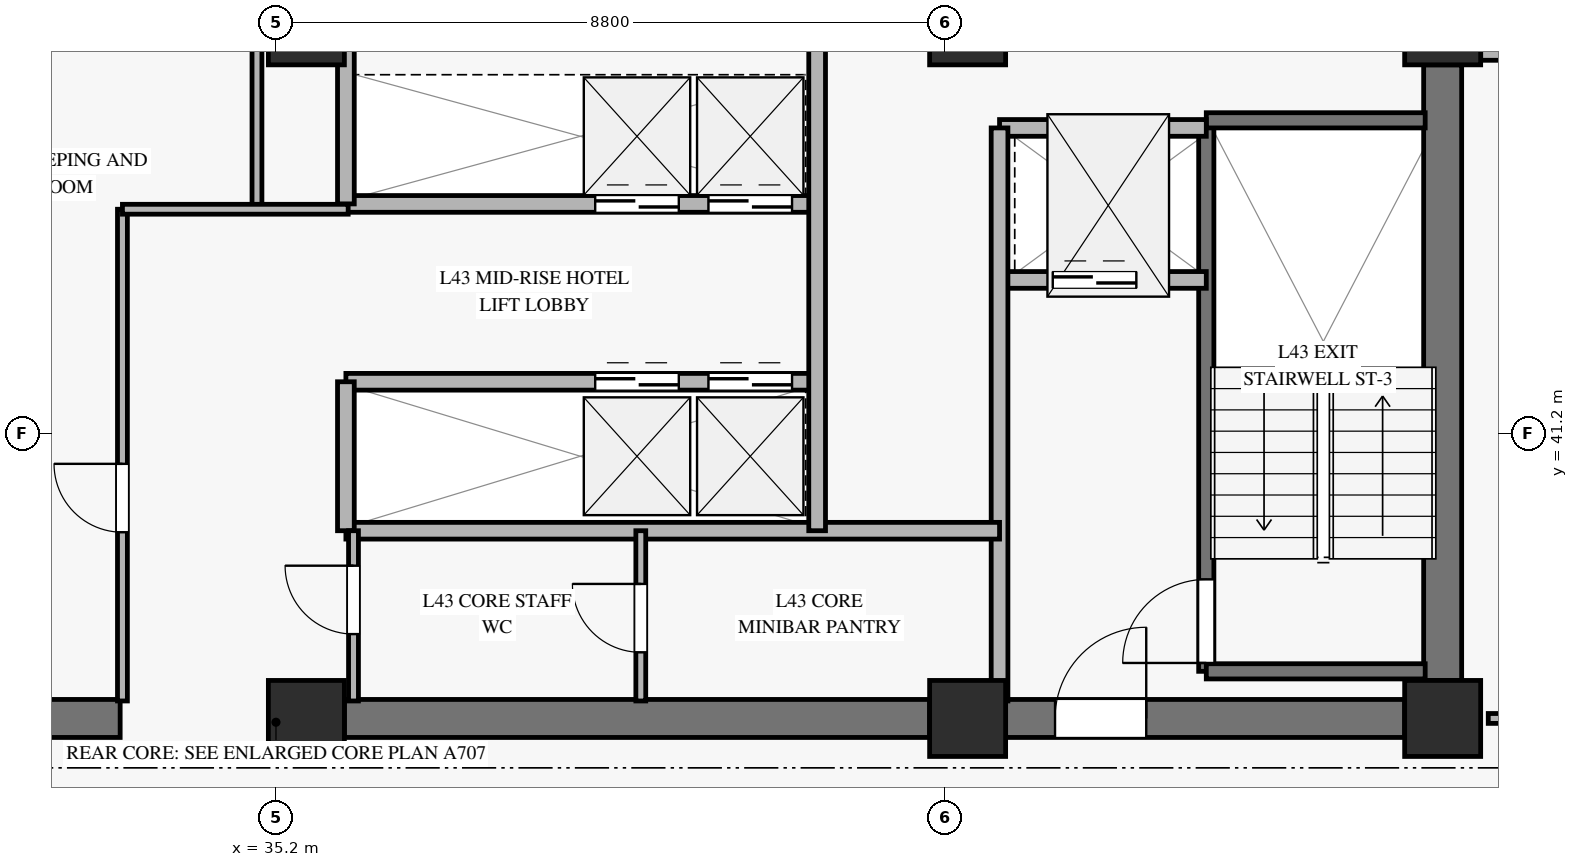
"""IFC4 building model, lengths in metres.
Left out: names, types, materials, properties, quantities, classifications, styles, units other than length and angle.
Written with IfcOpenShell. Run it as: python <this file> out.ifc"""

import sys

from ifc_helpers import new_model, si_unit, direction, frame, frame_2d, origin, origin_2d, place, context, subcontext, project, spatial, rectangle, extrude, source, transform, mapped, element, fill, save


model = new_model("IFC4")
c1 = context("Model", 3, precision=1e-05, world=origin(), true_north=direction((0.0, 1.0)))
c2 = subcontext(c1, "Body", "Model", "MODEL_VIEW")
j1 = project(units=[si_unit("LENGTHUNIT", "METRE"), si_unit("PLANEANGLEUNIT", "RADIAN")], contexts=[c1])
p1 = place(None, origin())
s1 = spatial("IfcSite", under=j1, at=p1, CompositionType="ELEMENT")
p2 = place(p1, origin())
s2 = spatial("IfcBuilding", under=s1, at=p2, CompositionType="ELEMENT")
p3 = place(p2, frame((0.0, 0.0, 173.7)))
s3 = spatial("IfcBuildingStorey", under=s2, at=p3, CompositionType="ELEMENT", Elevation=173.7)
m1 = source(origin(), c2, "Body", "SweptSolid", [
    extrude(rectangle(XDim=1.0, YDim=1.0, at=origin_2d()), origin(), (0.0, 0.0, 1.0), 3.27),
])
for number, where, z_axis, x_axis in (
    (1, (35.6, 37.45, 0.0), (0.0, 0.0, 1.0), (1.0, 0.0, 0.0)),
    (2, (35.6, 46.55, 0.0), (0.0, 0.0, 1.0), (1.0, 0.0, 0.0)),
    (3, (44.3, 37.45, 0.0), (0.0, 0.0, 1.0), (1.0, 0.0, 0.0)),
    (4, (44.3, 46.55, 0.0), (0.0, 0.0, 1.0), (1.0, 0.0, 0.0)),
    (5, (50.55, 37.45, 0.0), (0.0, 0.0, 1.0), (1.0, 0.0, 0.0)),
    (6, (50.55, 46.55, 0.0), (0.0, 0.0, 1.0), (1.0, 0.0, 0.0)),
):
    element("IfcColumn", number, at=place(p3, frame(where, z_axis=z_axis, x_axis=x_axis)), inside=s3, PredefinedType="PILASTER", context=c2, shape_type="MappedRepresentation", body=[
        mapped(m1, transform((0.0, 0.0, 0.0), x_axis=(1.0, 0.0, 0.0), y_axis=(0.0, 1.0, 0.0), z_axis=(0.0, 0.0, 1.0), scale=1.0)),
    ])
p4 = place(p3, frame((31.3, 37.45, 0.0), z_axis=(0.0, 0.0, 1.0), x_axis=(1.0, 0.0, 0.0)))
e7 = element("IfcWall", 7, at=p4, inside=s3, PredefinedType="SHEAR", context=c2, shape_type="SweptSolid", body=[
    extrude(rectangle(XDim=1.85, YDim=0.5, at=frame_2d((0.925, 0.0))), origin(), (0.0, 0.0, 1.0), 3.27),
])
p5 = place(p3, frame((36.1, 37.45, 0.0), z_axis=(0.0, 0.0, 1.0), x_axis=(1.0, 0.0, 0.0)))
e8 = element("IfcWall", 8, at=p5, inside=s3, PredefinedType="SHEAR", context=c2, shape_type="SweptSolid", body=[
    extrude(rectangle(XDim=7.7, YDim=0.5, at=frame_2d((3.85, 0.0))), origin(), (0.0, 0.0, 1.0), 3.27),
])
p6 = place(p3, frame((44.8, 37.45, 0.0), z_axis=(0.0, 0.0, 1.0), x_axis=(1.0, 0.0, 0.0)))
e9 = element("IfcWall", 9, at=p6, inside=s3, PredefinedType="SHEAR", context=c2, shape_type="SweptSolid", body=[
    extrude(rectangle(XDim=5.25, YDim=0.5, at=frame_2d((2.625, 0.0))), origin(), (0.0, 0.0, 1.0), 3.27),
])
p7 = place(p6, frame((0.65, 0.0, 0.0)))
e10 = element("IfcOpeningElement", 10, at=p7, cuts=e9, PredefinedType="OPENING", context=c2, shape_type="SweptSolid", body=[
    extrude(rectangle(XDim=1.2, YDim=2.15, at=frame_2d((0.6, 1.075))), frame((0.0, 0.26, 0.0), z_axis=(0.0, -1.0, 0.0), x_axis=(1.0, 0.0, 0.0)), (0.0, 0.0, 1.0), 0.52),
])
p8 = place(p3, frame((50.55, 37.95, 0.0), z_axis=(0.0, 0.0, 1.0), x_axis=(0.0, 1.0, 0.0)))
e11 = element("IfcWall", 11, at=p8, inside=s3, PredefinedType="SHEAR", context=c2, shape_type="SweptSolid", body=[
    extrude(rectangle(XDim=8.1, YDim=0.5, at=frame_2d((4.05, 0.0))), origin(), (0.0, 0.0, 1.0), 3.27),
])
p9 = place(p3, frame((51.05, 46.25, 0.0), z_axis=(0.0, 0.0, 1.0), x_axis=(1.0, 0.0, 0.0)))
e12 = element("IfcWall", 12, at=p9, inside=s3, PredefinedType="SOLIDWALL", context=c2, shape_type="SweptSolid", body=[
    extrude(rectangle(XDim=10.194, YDim=0.28, at=frame_2d((5.097, 0.0))), origin(), (0.0, 0.0, 1.0), 2.75),
])
p10 = place(p9, frame((4.297, 0.0, 0.45)))
e13 = element("IfcOpeningElement", 13, at=p10, cuts=e12, PredefinedType="OPENING", context=c2, shape_type="SweptSolid", body=[
    extrude(rectangle(XDim=1.6, YDim=2.0, at=frame_2d((0.8, 1.0))), frame((0.0, 0.15, 0.0), z_axis=(0.0, -1.0, 0.0), x_axis=(1.0, 0.0, 0.0)), (0.0, 0.0, 1.0), 0.3),
])
p11 = place(p3, frame((47.44, 38.07, 0.0), z_axis=(0.0, 0.0, 1.0), x_axis=(0.0, 1.0, 0.0)))
e14 = element("IfcWall", 14, at=p11, inside=s3, PredefinedType="SOLIDWALL", context=c2, shape_type="SweptSolid", body=[
    extrude(rectangle(XDim=7.25, YDim=0.2, at=frame_2d((3.625, 0.0))), origin(), (0.0, 0.0, 1.0), 3.5),
])
p12 = place(p11, frame((0.11, 0.0, 0.0)))
e15 = element("IfcOpeningElement", 15, at=p12, cuts=e14, PredefinedType="OPENING", context=c2, shape_type="SweptSolid", body=[
    extrude(rectangle(XDim=1.1, YDim=2.15, at=frame_2d((0.55, 1.075))), frame((0.0, 0.11, 0.0), z_axis=(0.0, -1.0, 0.0), x_axis=(1.0, 0.0, 0.0)), (0.0, 0.0, 1.0), 0.22),
])
for number, where, z_axis, x_axis in (
    (16, (47.44, 45.32, 0.0), (0.0, 0.0, 1.0), (1.0, 0.0, 0.0)),
    (17, (47.44, 38.07, 0.0), (0.0, 0.0, 1.0), (1.0, 0.0, 0.0)),
):
    element("IfcWall", number, at=place(p3, frame(where, z_axis=z_axis, x_axis=x_axis)), inside=s3, PredefinedType="SOLIDWALL", context=c2, shape_type="SweptSolid", body=[
        extrude(rectangle(XDim=2.88, YDim=0.2, at=frame_2d((1.44, 0.0))), origin(), (0.0, 0.0, 1.0), 3.5),
    ])
p13 = place(p3, frame((44.72, 43.22, 0.0), z_axis=(0.0, 0.0, 1.0), x_axis=(1.0, 0.0, 0.0)))
e18 = element("IfcWall", 18, at=p13, inside=s3, PredefinedType="SOLIDWALL", context=c2, shape_type="SweptSolid", body=[
    extrude(rectangle(XDim=2.72, YDim=0.22, at=frame_2d((1.36, 0.0))), origin(), (0.0, 0.0, 1.0), 3.27),
])
p14 = place(p13, frame((0.7, 0.0, 0.0)))
e19 = element("IfcOpeningElement", 19, at=p14, cuts=e18, PredefinedType="OPENING", context=c2, shape_type="SweptSolid", body=[
    extrude(rectangle(XDim=1.1, YDim=2.2, at=frame_2d((0.55, 1.1))), frame((0.0, 0.12, 0.0), z_axis=(0.0, -1.0, 0.0), x_axis=(1.0, 0.0, 0.0)), (0.0, 0.0, 1.0), 0.24),
])
p15 = place(p3, frame((44.72, 45.22, 0.0), z_axis=(0.0, 0.0, 1.0), x_axis=(1.0, 0.0, 0.0)))
e20 = element("IfcWall", 20, at=p15, inside=s3, PredefinedType="SOLIDWALL", context=c2, shape_type="SweptSolid", body=[
    extrude(rectangle(XDim=2.72, YDim=0.22, at=frame_2d((1.36, 0.0))), origin(), (0.0, 0.0, 1.0), 3.27),
])
p16 = place(p3, frame((44.72, 37.68, 0.0), z_axis=(0.0, 0.0, 1.0), x_axis=(0.0, 1.0, 0.0)))
e21 = element("IfcWall", 21, at=p16, inside=s3, PredefinedType="SOLIDWALL", context=c2, shape_type="SweptSolid", body=[
    extrude(rectangle(XDim=7.54, YDim=0.22, at=frame_2d((3.77, 0.0))), origin(), (0.0, 0.0, 1.0), 3.27),
])
p17 = place(p3, frame((36.12, 44.22, 0.0), z_axis=(0.0, 0.0, 1.0), x_axis=(1.0, 0.0, 0.0)))
e22 = element("IfcWall", 22, at=p17, inside=s3, PredefinedType="SOLIDWALL", context=c2, shape_type="SweptSolid", body=[
    extrude(rectangle(XDim=6.2, YDim=0.22, at=frame_2d((3.1, 0.0))), origin(), (0.0, 0.0, 1.0), 3.27),
])
p18 = place(p17, frame((3.28, 0.0, 0.0)))
e23 = element("IfcOpeningElement", 23, at=p18, cuts=e22, PredefinedType="OPENING", context=c2, shape_type="SweptSolid", body=[
    extrude(rectangle(XDim=1.1, YDim=2.2, at=frame_2d((0.55, 1.1))), frame((0.0, 0.12, 0.0), z_axis=(0.0, -1.0, 0.0), x_axis=(1.0, 0.0, 0.0)), (0.0, 0.0, 1.0), 0.24),
])
p19 = place(p17, frame((4.77, 0.0, 0.0)))
e24 = element("IfcOpeningElement", 24, at=p19, cuts=e22, PredefinedType="OPENING", context=c2, shape_type="SweptSolid", body=[
    extrude(rectangle(XDim=1.1, YDim=2.2, at=frame_2d((0.55, 1.1))), frame((0.0, 0.12, 0.0), z_axis=(0.0, -1.0, 0.0), x_axis=(1.0, 0.0, 0.0)), (0.0, 0.0, 1.0), 0.24),
])
p20 = place(p3, frame((36.12, 41.88, 0.0), z_axis=(0.0, 0.0, 1.0), x_axis=(1.0, 0.0, 0.0)))
e25 = element("IfcWall", 25, at=p20, inside=s3, PredefinedType="SOLIDWALL", context=c2, shape_type="SweptSolid", body=[
    extrude(rectangle(XDim=6.2, YDim=0.22, at=frame_2d((3.1, 0.0))), origin(), (0.0, 0.0, 1.0), 3.27),
])
p21 = place(p20, frame((3.28, 0.0, 0.0)))
e26 = element("IfcOpeningElement", 26, at=p21, cuts=e25, PredefinedType="OPENING", context=c2, shape_type="SweptSolid", body=[
    extrude(rectangle(XDim=1.1, YDim=2.2, at=frame_2d((0.55, 1.1))), frame((0.0, 0.12, 0.0), z_axis=(0.0, -1.0, 0.0), x_axis=(1.0, 0.0, 0.0)), (0.0, 0.0, 1.0), 0.24),
])
p22 = place(p20, frame((4.77, 0.0, 0.0)))
e27 = element("IfcOpeningElement", 27, at=p22, cuts=e25, PredefinedType="OPENING", context=c2, shape_type="SweptSolid", body=[
    extrude(rectangle(XDim=1.1, YDim=2.2, at=frame_2d((0.55, 1.1))), frame((0.0, 0.12, 0.0), z_axis=(0.0, -1.0, 0.0), x_axis=(1.0, 0.0, 0.0)), (0.0, 0.0, 1.0), 0.24),
])
p23 = place(p3, frame((36.12, 39.92, 0.0), z_axis=(0.0, 0.0, 1.0), x_axis=(1.0, 0.0, 0.0)))
e28 = element("IfcWall", 28, at=p23, inside=s3, PredefinedType="SOLIDWALL", context=c2, shape_type="SweptSolid", body=[
    extrude(rectangle(XDim=8.6, YDim=0.22, at=frame_2d((4.3, 0.0))), origin(), (0.0, 0.0, 1.0), 2.555),
])
p24 = place(p3, frame((42.32, 39.92, 0.0), z_axis=(0.0, 0.0, 1.0), x_axis=(0.0, 1.0, 0.0)))
e29 = element("IfcWall", 29, at=p24, inside=s3, PredefinedType="SOLIDWALL", context=c2, shape_type="SweptSolid", body=[
    extrude(rectangle(XDim=6.4, YDim=0.22, at=frame_2d((3.2, 0.0))), origin(), (0.0, 0.0, 1.0), 3.27),
])
p25 = place(p3, frame((36.12, 39.92, 0.0), z_axis=(0.0, 0.0, 1.0), x_axis=(0.0, 1.0, 0.0)))
e30 = element("IfcWall", 30, at=p25, inside=s3, PredefinedType="SOLIDWALL", context=c2, shape_type="SweptSolid", body=[
    extrude(rectangle(XDim=1.96, YDim=0.22, at=frame_2d((0.98, 0.0))), origin(), (0.0, 0.0, 1.0), 3.27),
])
p26 = place(p3, frame((36.12, 44.22, 0.0), z_axis=(0.0, 0.0, 1.0), x_axis=(0.0, 1.0, 0.0)))
e31 = element("IfcWall", 31, at=p26, inside=s3, PredefinedType="SOLIDWALL", context=c2, shape_type="SweptSolid", body=[
    extrude(rectangle(XDim=2.1, YDim=0.22, at=frame_2d((1.05, 0.0))), origin(), (0.0, 0.0, 1.0), 3.27),
])
p27 = place(p3, frame((33.18, 37.68, 0.0), z_axis=(0.0, 0.0, 1.0), x_axis=(0.0, 1.0, 0.0)))
e32 = element("IfcWall", 32, at=p27, inside=s3, PredefinedType="PARTITIONING", context=c2, shape_type="SweptSolid", body=[
    extrude(rectangle(XDim=6.47, YDim=0.13, at=frame_2d((3.235, 0.0))), origin(), (0.0, 0.0, 1.0), 2.355),
])
p28 = place(p27, frame((2.22, 0.0, 0.0)))
e33 = element("IfcOpeningElement", 33, at=p28, cuts=e32, PredefinedType="OPENING", context=c2, shape_type="SweptSolid", body=[
    extrude(rectangle(XDim=0.9, YDim=2.1, at=frame_2d((0.45, 1.05))), frame((0.0, 0.075, 0.0), z_axis=(0.0, -1.0, 0.0), x_axis=(1.0, 0.0, 0.0)), (0.0, 0.0, 1.0), 0.15),
])
p29 = place(p3, frame((34.95, 44.15, 0.0), z_axis=(0.0, 0.0, 1.0), x_axis=(0.0, 1.0, 0.0)))
e34 = element("IfcWall", 34, at=p29, inside=s3, PredefinedType="PARTITIONING", context=c2, shape_type="SweptSolid", body=[
    extrude(rectangle(XDim=2.17, YDim=0.13, at=frame_2d((1.085, 0.0))), origin(), (0.0, 0.0, 1.0), 3.27),
])
p30 = place(p3, frame((33.18, 44.15, 0.0), z_axis=(0.0, 0.0, 1.0), x_axis=(1.0, 0.0, 0.0)))
e35 = element("IfcWall", 35, at=p30, inside=s3, PredefinedType="PARTITIONING", context=c2, shape_type="SweptSolid", body=[
    extrude(rectangle(XDim=2.97, YDim=0.13, at=frame_2d((1.485, 0.0))), origin(), (0.0, 0.0, 1.0), 2.555),
])
p31 = place(p3, frame((36.22, 37.68, 0.0), z_axis=(0.0, 0.0, 1.0), x_axis=(0.0, 1.0, 0.0)))
e36 = element("IfcWall", 36, at=p31, inside=s3, PredefinedType="PARTITIONING", context=c2, shape_type="SweptSolid", body=[
    extrude(rectangle(XDim=2.24, YDim=0.13, at=frame_2d((1.12, 0.0))), origin(), (0.0, 0.0, 1.0), 3.27),
])
p32 = place(p31, frame((0.88, 0.0, 0.0)))
e37 = element("IfcOpeningElement", 37, at=p32, cuts=e36, PredefinedType="OPENING", context=c2, shape_type="SweptSolid", body=[
    extrude(rectangle(XDim=0.9, YDim=2.1, at=frame_2d((0.45, 1.05))), frame((0.0, 0.075, 0.0), z_axis=(0.0, -1.0, 0.0), x_axis=(1.0, 0.0, 0.0)), (0.0, 0.0, 1.0), 0.15),
])
p33 = place(p3, frame((40.0, 37.68, 0.0), z_axis=(0.0, 0.0, 1.0), x_axis=(0.0, 1.0, 0.0)))
e38 = element("IfcWall", 38, at=p33, inside=s3, PredefinedType="PARTITIONING", context=c2, shape_type="SweptSolid", body=[
    extrude(rectangle(XDim=2.24, YDim=0.13, at=frame_2d((1.12, 0.0))), origin(), (0.0, 0.0, 1.0), 3.27),
])
p34 = place(p33, frame((0.64, 0.0, 0.0)))
e39 = element("IfcOpeningElement", 39, at=p34, cuts=e38, PredefinedType="OPENING", context=c2, shape_type="SweptSolid", body=[
    extrude(rectangle(XDim=0.9, YDim=2.1, at=frame_2d((0.45, 1.05))), frame((0.0, 0.075, 0.0), z_axis=(0.0, -1.0, 0.0), x_axis=(1.0, 0.0, 0.0)), (0.0, 0.0, 1.0), 0.15),
])
p35 = place(p3, frame((51.15, 37.45, 0.0), z_axis=(0.0, 0.0, 1.0), x_axis=(1.0, 0.0, 0.0)))
e40 = element("IfcWall", 40, at=p35, inside=s3, PredefinedType="PARTITIONING", context=c2, shape_type="SweptSolid", body=[
    extrude(rectangle(XDim=13.331, YDim=0.13, at=frame_2d((6.666, 0.0))), origin(), (0.0, 0.0, 1.0), 2.755),
])
p36 = place(p35, frame((0.5, 0.0, 0.0)))
e41 = element("IfcOpeningElement", 41, at=p36, cuts=e40, PredefinedType="OPENING", context=c2, shape_type="SweptSolid", body=[
    extrude(rectangle(XDim=0.9, YDim=2.1, at=frame_2d((0.45, 1.05))), frame((0.0, 0.075, 0.0), z_axis=(0.0, -1.0, 0.0), x_axis=(1.0, 0.0, 0.0)), (0.0, 0.0, 1.0), 0.15),
])
p37 = place(p35, frame((9.772, 0.0, 0.0)))
e42 = element("IfcOpeningElement", 42, at=p37, cuts=e40, PredefinedType="OPENING", context=c2, shape_type="SweptSolid", body=[
    extrude(rectangle(XDim=0.95, YDim=2.1, at=frame_2d((0.475, 1.05))), frame((0.0, 0.075, 0.0), z_axis=(0.0, -1.0, 0.0), x_axis=(1.0, 0.0, 0.0)), (0.0, 0.0, 1.0), 0.15),
])
m2 = source(origin(), c2, "Body", "SweptSolid", [
    extrude(rectangle(XDim=1.1, YDim=2.15, at=frame_2d((0.55, 1.075))), frame((0.0, 0.025, 0.0), z_axis=(0.0, -1.0, 0.0), x_axis=(1.0, 0.0, 0.0)), (0.0, 0.0, 1.0), 0.05),
])
p38 = place(p12, origin())
e43 = element("IfcDoor", 43, at=p38, inside=s3, OperationType="SINGLE_SWING_LEFT", PredefinedType="DOOR", context=c2, shape_type="MappedRepresentation", body=[
    mapped(m2, transform((0.0, 0.0, 0.0), x_axis=(1.0, 0.0, 0.0), y_axis=(0.0, 1.0, 0.0), z_axis=(0.0, 0.0, 1.0), scale=1.0)),
])
fill(e15, e43)
m3 = source(origin(), c2, "Body", "SweptSolid", [
    extrude(rectangle(XDim=1.1, YDim=2.2, at=frame_2d((0.55, 1.1))), frame((0.0, 0.025, 0.0), z_axis=(0.0, -1.0, 0.0), x_axis=(1.0, 0.0, 0.0)), (0.0, 0.0, 1.0), 0.05),
])
p39 = place(p14, origin())
e44 = element("IfcDoor", 44, at=p39, inside=s3, OperationType="SLIDING_TO_LEFT", PredefinedType="DOOR", context=c2, shape_type="MappedRepresentation", body=[
    mapped(m3, transform((0.0, 0.0, 0.0), x_axis=(1.0, 0.0, 0.0), y_axis=(0.0, 1.0, 0.0), z_axis=(0.0, 0.0, 1.0), scale=1.0)),
])
fill(e19, e44)
m4 = source(origin(), c2, "Body", "SweptSolid", [
    extrude(rectangle(XDim=1.2, YDim=2.15, at=frame_2d((0.6, 1.075))), frame((0.0, 0.025, 0.0), z_axis=(0.0, -1.0, 0.0), x_axis=(1.0, 0.0, 0.0)), (0.0, 0.0, 1.0), 0.05),
])
p40 = place(p7, origin())
e45 = element("IfcDoor", 45, at=p40, inside=s3, OperationType="SINGLE_SWING_RIGHT", PredefinedType="DOOR", context=c2, shape_type="MappedRepresentation", body=[
    mapped(m4, transform((0.0, 0.0, 0.0), x_axis=(1.0, 0.0, 0.0), y_axis=(0.0, 1.0, 0.0), z_axis=(0.0, 0.0, 1.0), scale=1.0)),
])
fill(e10, e45)
p41 = place(p18, origin())
e46 = element("IfcDoor", 46, at=p41, inside=s3, OperationType="SLIDING_TO_LEFT", PredefinedType="DOOR", context=c2, shape_type="MappedRepresentation", body=[
    mapped(m3, transform((0.0, 0.0, 0.0), x_axis=(1.0, 0.0, 0.0), y_axis=(0.0, 1.0, 0.0), z_axis=(0.0, 0.0, 1.0), scale=1.0)),
])
fill(e23, e46)
p42 = place(p19, origin())
e47 = element("IfcDoor", 47, at=p42, inside=s3, OperationType="SLIDING_TO_LEFT", PredefinedType="DOOR", context=c2, shape_type="MappedRepresentation", body=[
    mapped(m3, transform((0.0, 0.0, 0.0), x_axis=(1.0, 0.0, 0.0), y_axis=(0.0, 1.0, 0.0), z_axis=(0.0, 0.0, 1.0), scale=1.0)),
])
fill(e24, e47)
p43 = place(p21, origin())
e48 = element("IfcDoor", 48, at=p43, inside=s3, OperationType="SLIDING_TO_LEFT", PredefinedType="DOOR", context=c2, shape_type="MappedRepresentation", body=[
    mapped(m3, transform((0.0, 0.0, 0.0), x_axis=(1.0, 0.0, 0.0), y_axis=(0.0, 1.0, 0.0), z_axis=(0.0, 0.0, 1.0), scale=1.0)),
])
fill(e26, e48)
p44 = place(p22, origin())
e49 = element("IfcDoor", 49, at=p44, inside=s3, OperationType="SLIDING_TO_LEFT", PredefinedType="DOOR", context=c2, shape_type="MappedRepresentation", body=[
    mapped(m3, transform((0.0, 0.0, 0.0), x_axis=(1.0, 0.0, 0.0), y_axis=(0.0, 1.0, 0.0), z_axis=(0.0, 0.0, 1.0), scale=1.0)),
])
fill(e27, e49)
m5 = source(origin(), c2, "Body", "SweptSolid", [
    extrude(rectangle(XDim=0.9, YDim=2.1, at=frame_2d((0.45, 1.05))), frame((0.0, 0.025, 0.0), z_axis=(0.0, -1.0, 0.0), x_axis=(1.0, 0.0, 0.0)), (0.0, 0.0, 1.0), 0.05),
])
p45 = place(p28, origin())
e50 = element("IfcDoor", 50, at=p45, inside=s3, OperationType="SINGLE_SWING_RIGHT", PredefinedType="DOOR", context=c2, shape_type="MappedRepresentation", body=[
    mapped(m5, transform((0.0, 0.0, 0.0), x_axis=(1.0, 0.0, 0.0), y_axis=(0.0, 1.0, 0.0), z_axis=(0.0, 0.0, 1.0), scale=1.0)),
])
fill(e33, e50)
p46 = place(p32, origin())
e51 = element("IfcDoor", 51, at=p46, inside=s3, OperationType="SINGLE_SWING_RIGHT", PredefinedType="DOOR", context=c2, shape_type="MappedRepresentation", body=[
    mapped(m5, transform((0.0, 0.0, 0.0), x_axis=(1.0, 0.0, 0.0), y_axis=(0.0, 1.0, 0.0), z_axis=(0.0, 0.0, 1.0), scale=1.0)),
])
fill(e37, e51)
p47 = place(p34, origin())
e52 = element("IfcDoor", 52, at=p47, inside=s3, OperationType="SINGLE_SWING_RIGHT", PredefinedType="DOOR", context=c2, shape_type="MappedRepresentation", body=[
    mapped(m5, transform((0.0, 0.0, 0.0), x_axis=(1.0, 0.0, 0.0), y_axis=(0.0, 1.0, 0.0), z_axis=(0.0, 0.0, 1.0), scale=1.0)),
])
fill(e39, e52)
save(model, sys.argv[1])
